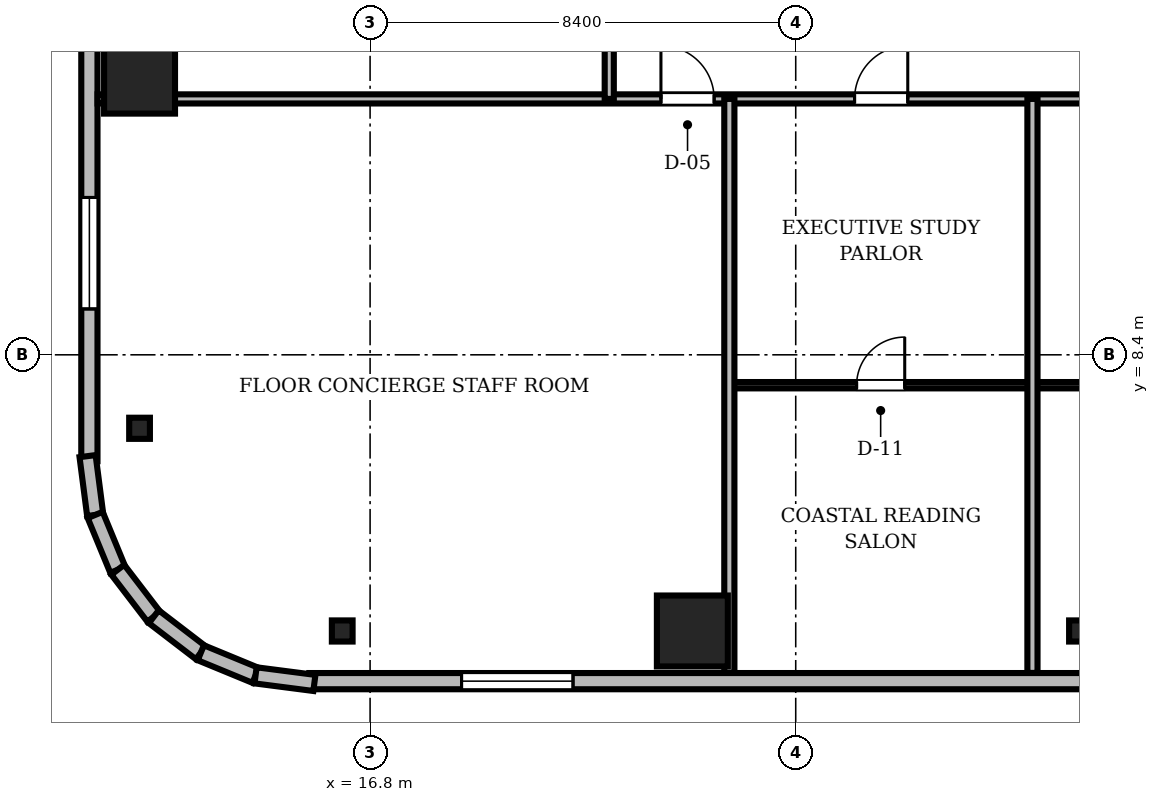
"""IFC4 building model, lengths in metres.
Left out: names, types, materials, properties, quantities, classifications, styles, units other than length and angle.
Written with IfcOpenShell. Run it as: python <this file> out.ifc"""

import sys

from ifc_helpers import new_model, si_unit, direction, frame, frame_2d, origin, origin_2d, place, context, subcontext, project, spatial, rectangle, i_section, extrude, source, transform, mapped, element, fill, save


model = new_model("IFC4")
c1 = context("Model", 3, precision=1e-05, world=origin(), true_north=direction((0.0, 1.0)))
c2 = subcontext(c1, "Body", "Model", "MODEL_VIEW")
j1 = project(units=[si_unit("LENGTHUNIT", "METRE"), si_unit("PLANEANGLEUNIT", "RADIAN")], contexts=[c1])
p1 = place(None, origin())
s1 = spatial("IfcSite", under=j1, at=p1, CompositionType="ELEMENT")
p2 = place(p1, origin())
s2 = spatial("IfcBuilding", under=s1, at=p2, CompositionType="ELEMENT")
p3 = place(p2, frame((0.0, 0.0, 207.3)))
s3 = spatial("IfcBuildingStorey", under=s2, at=p3, CompositionType="ELEMENT", Elevation=207.3)
m1 = source(origin(), c2, "Body", "SweptSolid", [
    extrude(rectangle(XDim=1.4, YDim=1.4, at=origin_2d()), origin(), (0.0, 0.0, 1.0), 3.53),
])
for number, where, z_axis, x_axis in (
    (1, (23.16, 2.95, 0.0), (0.0, 0.0, 1.0), (1.0, 0.0, 0.0)),
    (2, (12.25, 13.86, 0.0), (0.0, 0.0, 1.0), (1.0, 0.0, 0.0)),
):
    element("IfcColumn", number, at=place(p3, frame(where, z_axis=z_axis, x_axis=x_axis)), inside=s3, PredefinedType="COLUMN", context=c2, shape_type="MappedRepresentation", body=[
        mapped(m1, transform((0.0, 0.0, 0.0), scale=1.0)),
    ])
m2 = source(origin(), c2, "Body", "SweptSolid", [
    extrude(i_section(OverallWidth=0.409, OverallDepth=0.417, WebThickness=0.021, FlangeThickness=0.033, FilletRadius=0.015, at=origin_2d()), origin(), (0.0, 0.0, 1.0), 3.53),
])
for number, where, z_axis, x_axis in (
    (3, (16.25, 2.95, 0.0), (0.0, 0.0, 1.0), (1.0, 0.0, 0.0)),
    (4, (30.8, 2.95, 0.0), (0.0, 0.0, 1.0), (1.0, 0.0, 0.0)),
    (5, (12.25, 6.95, 0.0), (0.0, 0.0, 1.0), (1.0, 0.0, 0.0)),
):
    element("IfcColumn", number, at=place(p3, frame(where, z_axis=z_axis, x_axis=x_axis)), inside=s3, PredefinedType="COLUMN", context=c2, shape_type="MappedRepresentation", body=[
        mapped(m2, transform((0.0, 0.0, 0.0), scale=1.0)),
    ])
m3 = source(origin(), c2, "Body", "SweptSolid", [
    extrude(rectangle(XDim=15.6, YDim=0.32, at=frame_2d((7.8, 0.0))), origin(), (0.0, 0.0, 1.0), 3.53),
])
p4 = place(p3, frame((15.6, 1.96, 0.0), z_axis=(0.0, 0.0, 1.0), x_axis=(1.0, 0.0, 0.0)))
e6 = element("IfcWall", 6, at=p4, inside=s3, PredefinedType="SOLIDWALL", context=c2, shape_type="MappedRepresentation", body=[
    mapped(m3, transform((0.0, 0.0, 0.0), scale=1.0)),
])
m4 = source(origin(), c2, "Body", "SweptSolid", [
    extrude(rectangle(XDim=2.2, YDim=2.4, at=frame_2d((1.1, 1.2))), frame((0.0, 0.17, 0.0), z_axis=(0.0, -1.0, 0.0), x_axis=(1.0, 0.0, 0.0)), (0.0, 0.0, 1.0), 0.34),
])
p5 = place(p4, frame((3.005, 0.0, 0.72)))
e7 = element("IfcOpeningElement", 7, at=p5, cuts=e6, PredefinedType="OPENING", context=c2, shape_type="MappedRepresentation", body=[
    mapped(m4, transform((0.0, 0.0, 0.0), scale=1.0)),
])
p6 = place(p3, frame((11.26, 21.9, 0.0), z_axis=(0.0, 0.0, 1.0), x_axis=(0.0, -1.0, 0.0)))
e8 = element("IfcWall", 8, at=p6, inside=s3, PredefinedType="SOLIDWALL", context=c2, shape_type="MappedRepresentation", body=[
    mapped(m3, transform((0.0, 0.0, 0.0), scale=1.0)),
])
m5 = source(origin(), c2, "Body", "SweptSolid", [
    extrude(rectangle(XDim=1.4, YDim=2.3, at=frame_2d((0.7, 1.15))), frame((0.0, 0.17, 0.0), z_axis=(0.0, -1.0, 0.0), x_axis=(1.0, 0.0, 0.0)), (0.0, 0.0, 1.0), 0.34),
])
p7 = place(p6, frame((4.59, 0.0, 0.0)))
e9 = element("IfcOpeningElement", 9, at=p7, cuts=e8, PredefinedType="OPENING", context=c2, shape_type="MappedRepresentation", body=[
    mapped(m5, transform((0.0, 0.0, 0.0), scale=1.0)),
])
p8 = place(p6, frame((10.395, 0.0, 0.72)))
e10 = element("IfcOpeningElement", 10, at=p8, cuts=e8, PredefinedType="OPENING", context=c2, shape_type="MappedRepresentation", body=[
    mapped(m4, transform((0.0, 0.0, 0.0), scale=1.0)),
])
m6 = source(origin(), c2, "Body", "SweptSolid", [
    extrude(rectangle(XDim=1.171, YDim=0.32, at=frame_2d((0.585, 0.0))), origin(), (0.0, 0.0, 1.0), 3.53),
])
p9 = place(p3, frame((11.224, 6.401, 0.0), z_axis=(0.0, 0.0, 1.0), x_axis=(0.128269133229, -0.991739395941, 0.0)))
e11 = element("IfcWall", 11, at=p9, inside=s3, PredefinedType="SOLIDWALL", context=c2, shape_type="MappedRepresentation", body=[
    mapped(m6, transform((0.0, 0.0, 0.0), scale=1.0)),
])
m7 = source(origin(), c2, "Body", "SweptSolid", [
    extrude(rectangle(XDim=1.169, YDim=0.32, at=frame_2d((0.584, 0.0))), origin(), (0.0, 0.0, 1.0), 3.53),
])
for number, where, z_axis, x_axis in (
    (12, (11.375, 5.24, 0.0), (0.0, 0.0, 1.0), (0.381, -0.925, 0.0)),
    (13, (11.82, 4.159, 0.0), (0.0, 0.0, 1.0), (0.608, -0.794, 0.0)),
):
    element("IfcWall", number, at=place(p3, frame(where, z_axis=z_axis, x_axis=x_axis)), inside=s3, PredefinedType="SOLIDWALL", context=c2, shape_type="MappedRepresentation", body=[
        mapped(m7, transform((0.0, 0.0, 0.0), scale=1.0)),
    ])
m8 = source(origin(), c2, "Body", "SweptSolid", [
    extrude(rectangle(XDim=1.169, YDim=0.32, at=frame_2d((0.584, 0.0))), origin(), (0.0, 0.0, 1.0), 3.53),
])
p10 = place(p3, frame((12.531, 3.231, 0.0), z_axis=(0.0, 0.0, 1.0), x_axis=(0.793663520347, -0.608356981114, 0.0)))
e14 = element("IfcWall", 14, at=p10, inside=s3, PredefinedType="SOLIDWALL", context=c2, shape_type="MappedRepresentation", body=[
    mapped(m8, transform((0.0, 0.0, 0.0), scale=1.0)),
])
m9 = source(origin(), c2, "Body", "SweptSolid", [
    extrude(rectangle(XDim=1.169, YDim=0.32, at=frame_2d((0.585, 0.0))), origin(), (0.0, 0.0, 1.0), 3.53),
])
p11 = place(p3, frame((13.459, 2.52, 0.0), z_axis=(0.0, 0.0, 1.0), x_axis=(0.924479075121, -0.381232789334, 0.0)))
e15 = element("IfcWall", 15, at=p11, inside=s3, PredefinedType="SOLIDWALL", context=c2, shape_type="MappedRepresentation", body=[
    mapped(m9, transform((0.0, 0.0, 0.0), scale=1.0)),
])
m10 = source(origin(), c2, "Body", "SweptSolid", [
    extrude(rectangle(XDim=1.17, YDim=0.32, at=frame_2d((0.585, 0.0))), origin(), (0.0, 0.0, 1.0), 3.53),
])
p12 = place(p3, frame((14.54, 2.074, 0.0), z_axis=(0.0, 0.0, 1.0), x_axis=(0.991762485493, -0.128090485085, 0.0)))
e16 = element("IfcWall", 16, at=p12, inside=s3, PredefinedType="SOLIDWALL", context=c2, shape_type="MappedRepresentation", body=[
    mapped(m10, transform((0.0, 0.0, 0.0), scale=1.0)),
])
m11 = source(origin(), c2, "Body", "SweptSolid", [
    extrude(rectangle(XDim=46.156, YDim=0.18, at=frame_2d((23.078, 0.0))), origin(), (0.0, 0.0, 1.0), 2.772),
])
p13 = place(p3, frame((11.422, 13.45, 0.0), z_axis=(0.0, 0.0, 1.0), x_axis=(1.0, 0.0, 0.0)))
e17 = element("IfcWall", 17, at=p13, inside=s3, PredefinedType="PARTITIONING", context=c2, shape_type="MappedRepresentation", body=[
    mapped(m11, transform((0.0, 0.0, 0.0), scale=1.0)),
])
m12 = source(origin(), c2, "Body", "SweptSolid", [
    extrude(rectangle(XDim=1.05, YDim=2.2, at=frame_2d((0.525, 1.1))), frame((0.0, 0.1, 0.0), z_axis=(0.0, -1.0, 0.0), x_axis=(1.0, 0.0, 0.0)), (0.0, 0.0, 1.0), 0.2),
])
p14 = place(p13, frame((11.118, 0.0, 0.0)))
e18 = element("IfcOpeningElement", 18, at=p14, cuts=e17, PredefinedType="OPENING", context=c2, shape_type="MappedRepresentation", body=[
    mapped(m12, transform((0.0, 0.0, 0.0), scale=1.0)),
])
p15 = place(p13, frame((14.939, 0.0, 0.0)))
e19 = element("IfcOpeningElement", 19, at=p15, cuts=e17, PredefinedType="OPENING", context=c2, shape_type="MappedRepresentation", body=[
    mapped(m12, transform((0.0, 0.0, 0.0), scale=1.0)),
])
p16 = place(p13, frame((20.922, 0.0, 0.0)))
e20 = element("IfcOpeningElement", 20, at=p16, cuts=e17, PredefinedType="OPENING", context=c2, shape_type="MappedRepresentation", body=[
    mapped(m12, transform((0.0, 0.0, 0.0), scale=1.0)),
])
p17 = place(p13, frame((26.904, 0.0, 0.0)))
e21 = element("IfcOpeningElement", 21, at=p17, cuts=e17, PredefinedType="OPENING", context=c2, shape_type="MappedRepresentation", body=[
    mapped(m12, transform((0.0, 0.0, 0.0), scale=1.0)),
])
p18 = place(p13, frame((32.887, 0.0, 0.0)))
e22 = element("IfcOpeningElement", 22, at=p18, cuts=e17, PredefinedType="OPENING", context=c2, shape_type="MappedRepresentation", body=[
    mapped(m12, transform((0.0, 0.0, 0.0), scale=1.0)),
])
p19 = place(p13, frame((37.498, 0.0, 0.0)))
e23 = element("IfcOpeningElement", 23, at=p19, cuts=e17, PredefinedType="OPENING", context=c2, shape_type="MappedRepresentation", body=[
    mapped(m12, transform((0.0, 0.0, 0.0), scale=1.0)),
])
m13 = source(origin(), c2, "Body", "SweptSolid", [
    extrude(rectangle(XDim=15.1, YDim=0.18, at=frame_2d((7.55, 0.0))), origin(), (0.0, 0.0, 1.0), 2.972),
])
p20 = place(p3, frame((21.52, 13.45, 0.0), z_axis=(0.0, 0.0, 1.0), x_axis=(0.0, 1.0, 0.0)))
e24 = element("IfcWall", 24, at=p20, inside=s3, PredefinedType="PARTITIONING", context=c2, shape_type="MappedRepresentation", body=[
    mapped(m13, transform((0.0, 0.0, 0.0), scale=1.0)),
])
p21 = place(p20, frame((1.972, 0.0, 0.0)))
e25 = element("IfcOpeningElement", 25, at=p21, cuts=e24, PredefinedType="OPENING", context=c2, shape_type="MappedRepresentation", body=[
    mapped(m12, transform((0.0, 0.0, 0.0), scale=1.0)),
])
m14 = source(origin(), c2, "Body", "SweptSolid", [
    extrude(rectangle(XDim=0.95, YDim=2.15, at=frame_2d((0.475, 1.075))), frame((0.0, 0.1, 0.0), z_axis=(0.0, -1.0, 0.0), x_axis=(1.0, 0.0, 0.0)), (0.0, 0.0, 1.0), 0.2),
])
p22 = place(p20, frame((8.18, 0.0, 0.0)))
e26 = element("IfcOpeningElement", 26, at=p22, cuts=e24, PredefinedType="OPENING", context=c2, shape_type="MappedRepresentation", body=[
    mapped(m14, transform((0.0, 0.0, 0.0), scale=1.0)),
])
p23 = place(p20, frame((13.163, 0.0, 0.0)))
e27 = element("IfcOpeningElement", 27, at=p23, cuts=e24, PredefinedType="OPENING", context=c2, shape_type="MappedRepresentation", body=[
    mapped(m14, transform((0.0, 0.0, 0.0), scale=1.0)),
])
m15 = source(origin(), c2, "Body", "SweptSolid", [
    extrude(rectangle(XDim=5.983, YDim=0.125, at=frame_2d((2.991, 0.0))), origin(), (0.0, 0.0, 1.0), 2.972),
])
p24 = place(p3, frame((29.872, 7.8, 0.0), z_axis=(0.0, 0.0, 1.0), x_axis=(1.0, 0.0, 0.0)))
e28 = element("IfcWall", 28, at=p24, inside=s3, PredefinedType="PARTITIONING", context=c2, shape_type="MappedRepresentation", body=[
    mapped(m15, transform((0.0, 0.0, 0.0), scale=1.0)),
])
m16 = source(origin(), c2, "Body", "SweptSolid", [
    extrude(rectangle(XDim=0.95, YDim=2.15, at=frame_2d((0.475, 1.075))), frame((0.0, 0.073, 0.0), z_axis=(0.0, -1.0, 0.0), x_axis=(1.0, 0.0, 0.0)), (0.0, 0.0, 1.0), 0.145),
])
p25 = place(p24, frame((2.511, 0.0, 0.0)))
e29 = element("IfcOpeningElement", 29, at=p25, cuts=e28, PredefinedType="OPENING", context=c2, shape_type="MappedRepresentation", body=[
    mapped(m16, transform((0.0, 0.0, 0.0), scale=1.0)),
])
m17 = source(origin(), c2, "Body", "SweptSolid", [
    extrude(rectangle(XDim=5.982, YDim=0.125, at=frame_2d((2.991, 0.0))), origin(), (0.0, 0.0, 1.0), 2.972),
])
p26 = place(p3, frame((23.89, 7.8, 0.0), z_axis=(0.0, 0.0, 1.0), x_axis=(1.0, 0.0, 0.0)))
e30 = element("IfcWall", 30, at=p26, inside=s3, PredefinedType="PARTITIONING", context=c2, shape_type="MappedRepresentation", body=[
    mapped(m17, transform((0.0, 0.0, 0.0), scale=1.0)),
])
p27 = place(p26, frame((2.511, 0.0, 0.0)))
e31 = element("IfcOpeningElement", 31, at=p27, cuts=e30, PredefinedType="OPENING", context=c2, shape_type="MappedRepresentation", body=[
    mapped(m16, transform((0.0, 0.0, 0.0), scale=1.0)),
])
m18 = source(origin(), c2, "Body", "SweptSolid", [
    extrude(rectangle(XDim=11.328, YDim=0.2, at=frame_2d((5.664, 0.0))), origin(), (0.0, 0.0, 1.0), 2.772),
])
for number, where, z_axis, x_axis in (
    (32, (23.89, 2.122, 0.0), (0.0, 0.0, 1.0), (0.0, 1.0, 0.0)),
    (33, (29.872, 2.122, 0.0), (0.0, 0.0, 1.0), (0.0, 1.0, 0.0)),
):
    element("IfcWall", number, at=place(p3, frame(where, z_axis=z_axis, x_axis=x_axis)), inside=s3, PredefinedType="PARTITIONING", context=c2, shape_type="MappedRepresentation", body=[
        mapped(m18, transform((0.0, 0.0, 0.0), scale=1.0)),
    ])
m19 = source(origin(), c2, "Body", "SweptSolid", [
    extrude(rectangle(XDim=2.2, YDim=2.4, at=frame_2d((1.1, 1.2))), frame((0.0, 0.03, 0.0), z_axis=(0.0, -1.0, 0.0), x_axis=(1.0, 0.0, 0.0)), (0.0, 0.0, 1.0), 0.06),
])
p28 = place(p5, origin())
e34 = element("IfcWindow", 34, at=p28, inside=s3, PartitioningType="SINGLE_PANEL", PredefinedType="WINDOW", context=c2, shape_type="MappedRepresentation", body=[
    mapped(m19, transform((0.0, 0.0, 0.0), scale=1.0)),
])
fill(e7, e34)
p29 = place(p8, origin())
e35 = element("IfcWindow", 35, at=p29, inside=s3, PartitioningType="SINGLE_PANEL", PredefinedType="WINDOW", context=c2, shape_type="MappedRepresentation", body=[
    mapped(m19, transform((0.0, 0.0, 0.0), scale=1.0)),
])
fill(e10, e35)
m20 = source(origin(), c2, "Body", "SweptSolid", [
    extrude(rectangle(XDim=1.05, YDim=2.2, at=frame_2d((0.525, 1.1))), frame((0.0, 0.025, 0.0), z_axis=(0.0, -1.0, 0.0), x_axis=(1.0, 0.0, 0.0)), (0.0, 0.0, 1.0), 0.05),
])
p30 = place(p14, origin())
e36 = element("IfcDoor", 36, at=p30, inside=s3, OperationType="SINGLE_SWING_LEFT", PredefinedType="DOOR", context=c2, shape_type="MappedRepresentation", body=[
    mapped(m20, transform((0.0, 0.0, 0.0), scale=1.0)),
])
fill(e18, e36)
p31 = place(p15, origin())
e37 = element("IfcDoor", 37, at=p31, inside=s3, OperationType="SINGLE_SWING_RIGHT", PredefinedType="DOOR", context=c2, shape_type="MappedRepresentation", body=[
    mapped(m20, transform((0.0, 0.0, 0.0), scale=1.0)),
])
fill(e19, e37)
m21 = source(origin(), c2, "Body", "SweptSolid", [
    extrude(rectangle(XDim=0.95, YDim=2.15, at=frame_2d((0.475, 1.075))), frame((0.0, 0.025, 0.0), z_axis=(0.0, -1.0, 0.0), x_axis=(1.0, 0.0, 0.0)), (0.0, 0.0, 1.0), 0.05),
])
p32 = place(p27, origin())
e38 = element("IfcDoor", 38, at=p32, inside=s3, OperationType="SINGLE_SWING_RIGHT", PredefinedType="DOOR", context=c2, shape_type="MappedRepresentation", body=[
    mapped(m21, transform((0.0, 0.0, 0.0), scale=1.0)),
])
fill(e31, e38)
save(model, sys.argv[1])
